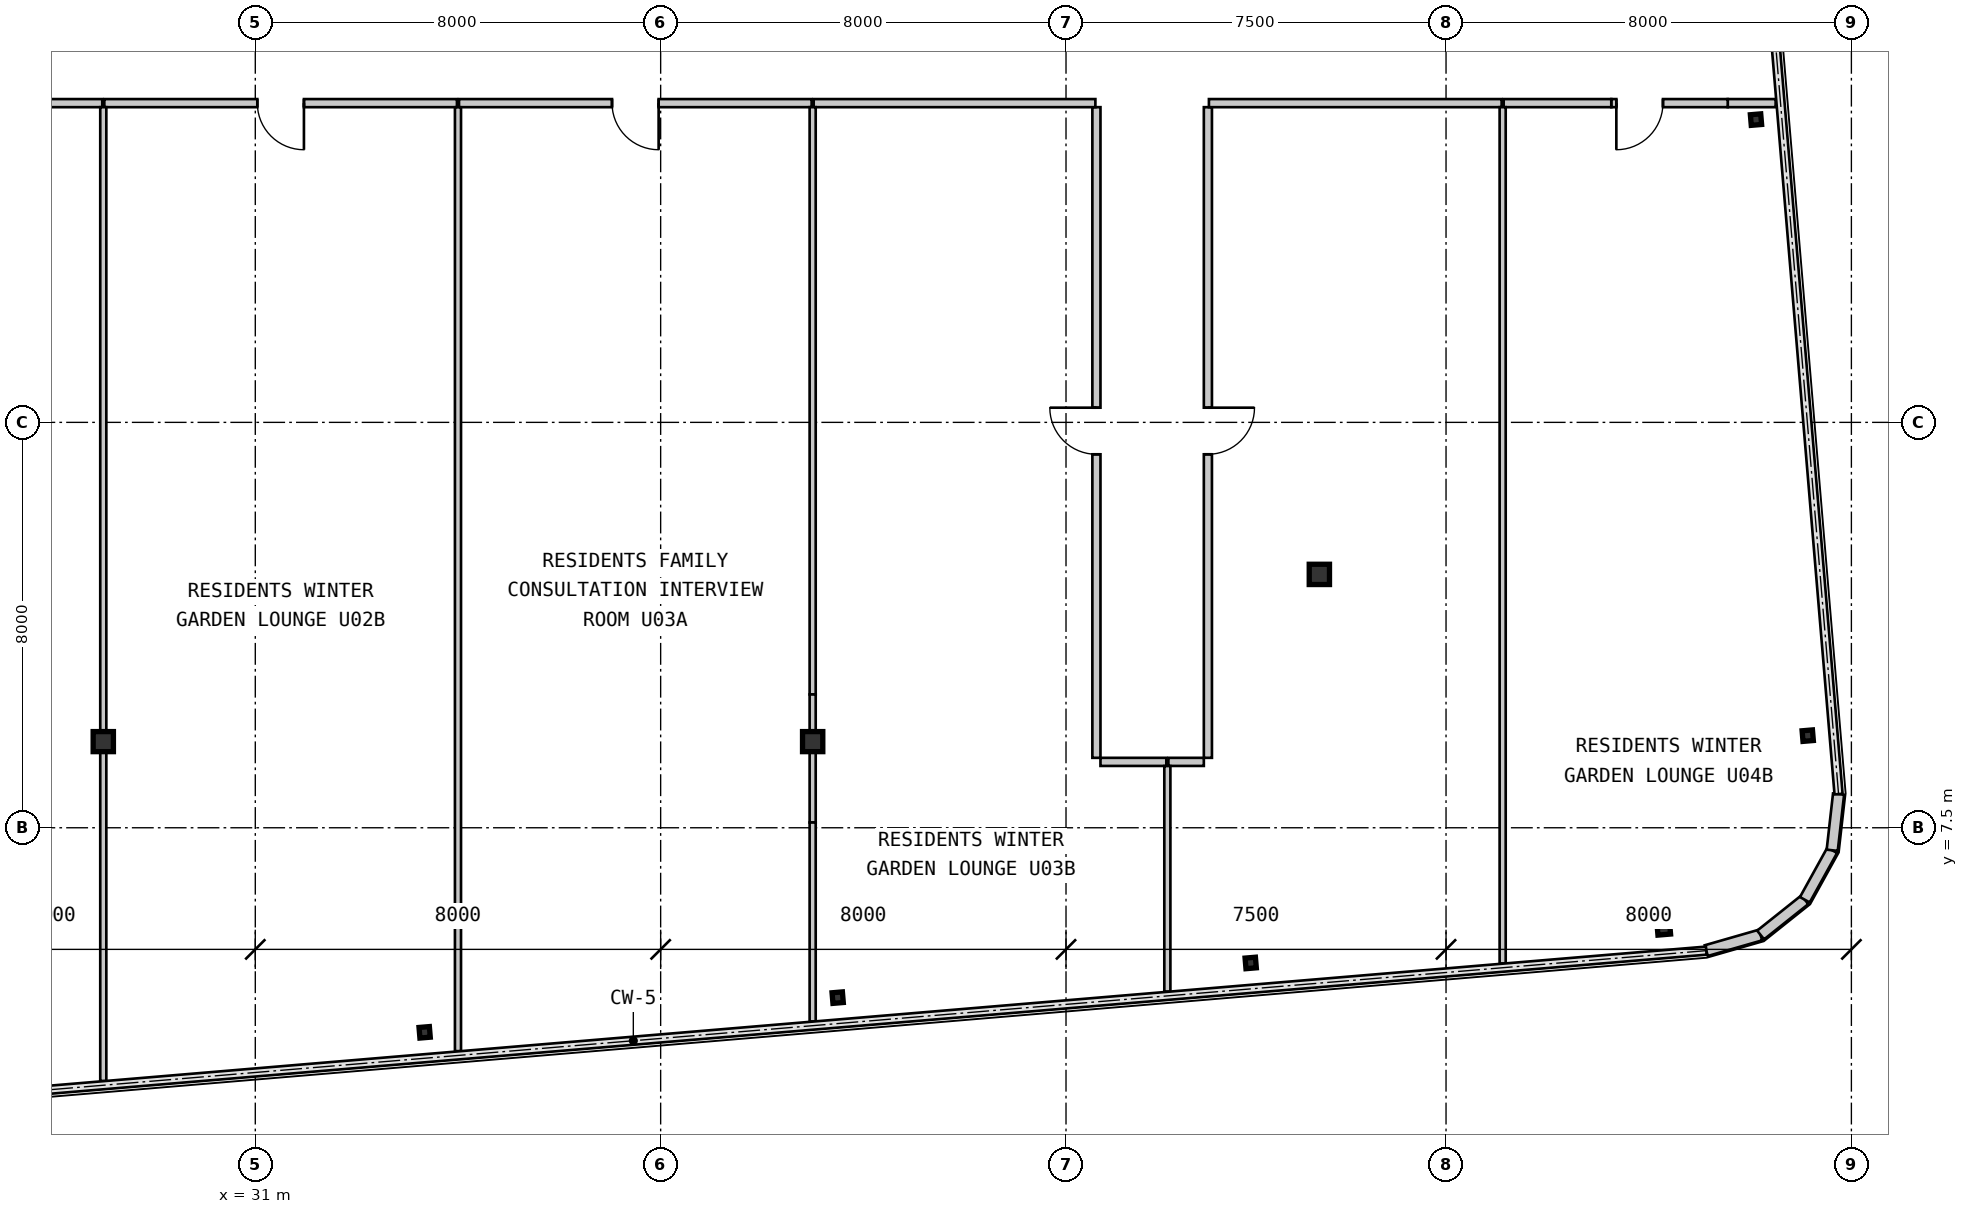
"""IFC4 building model, lengths in metres.
Left out: names, types, materials, properties, quantities, classifications, styles, units other than length and angle.
Written with IfcOpenShell. Run it as: python <this file> out.ifc"""

import sys

from ifc_helpers import new_model, si_unit, direction, frame, frame_2d, origin, origin_2d, place, context, subcontext, project, spatial, rectangle, hollow_rectangle, i_section, extrude, source, transform, mapped, element, fill, save


model = new_model("IFC4")
c1 = context("Model", 3, precision=1e-05, world=origin(), true_north=direction((0.0, 1.0)))
c2 = subcontext(c1, "Body", "Model", "MODEL_VIEW")
j1 = project(units=[si_unit("LENGTHUNIT", "METRE"), si_unit("PLANEANGLEUNIT", "RADIAN")], contexts=[c1])
p1 = place(None, origin())
s1 = spatial("IfcSite", under=j1, at=p1, CompositionType="ELEMENT")
p2 = place(p1, origin())
s2 = spatial("IfcBuilding", under=s1, at=p2, CompositionType="ELEMENT")
p3 = place(p2, frame((0.0, 0.0, 178.85)))
s3 = spatial("IfcBuildingStorey", under=s2, at=p3, CompositionType="ELEMENT", Elevation=178.85)
m1 = source(origin(), c2, "Body", "SweptSolid", [
    extrude(i_section(OverallWidth=0.4, OverallDepth=0.396, WebThickness=0.022, FlangeThickness=0.034, at=origin_2d()), origin(), (0.0, 0.0, 1.0), 3.15),
])
for number, where, z_axis, x_axis in (
    (1, (28.0, 9.2, 0.0), (0.0, 0.0, 1.0), (1.0, 0.0, 0.0)),
    (2, (42.0, 9.2, 0.0), (0.0, 0.0, 1.0), (1.0, 0.0, 0.0)),
):
    element("IfcColumn", number, at=place(p3, frame(where, z_axis=z_axis, x_axis=x_axis)), inside=s3, PredefinedType="COLUMN", context=c2, shape_type="MappedRepresentation", body=[
        mapped(m1, transform((0.0, 0.0, 0.0), scale=1.0)),
    ])
m2 = source(origin(), c2, "Body", "SweptSolid", [
    extrude(hollow_rectangle(XDim=0.4, YDim=0.4, WallThickness=0.016, at=origin_2d()), origin(), (0.0, 0.0, 1.0), 3.15),
])
p4 = place(p3, frame((52.0, 12.5, 0.0), z_axis=(0.0, 0.0, 1.0), x_axis=(1.0, 0.0, 0.0)))
e3 = element("IfcColumn", 3, at=p4, inside=s3, PredefinedType="COLUMN", context=c2, shape_type="MappedRepresentation", body=[
    mapped(m2, transform((0.0, 0.0, 0.0), scale=1.0)),
])
m3 = source(origin(), c2, "Body", "SweptSolid", [
    extrude(i_section(OverallWidth=0.205, OverallDepth=0.21, WebThickness=0.009, FlangeThickness=0.014, at=origin_2d()), origin(), (0.0, 0.0, 1.0), 3.15),
])
for number, where, z_axis, x_axis in (
    (4, (34.342, 3.463, 0.0), (0.0, 0.0, 1.0), (0.996, 0.084, 0.0)),
    (5, (42.494, 4.147, 0.0), (0.0, 0.0, 1.0), (0.996, 0.084, 0.0)),
    (6, (50.645, 4.832, 0.0), (0.0, 0.0, 1.0), (0.996, 0.084, 0.0)),
):
    element("IfcColumn", number, at=place(p3, frame(where, z_axis=z_axis, x_axis=x_axis)), inside=s3, PredefinedType="COLUMN", context=c2, shape_type="MappedRepresentation", body=[
        mapped(m3, transform((0.0, 0.0, 0.0), scale=1.0)),
    ])
m4 = source(origin(), c2, "Body", "SweptSolid", [
    extrude(hollow_rectangle(XDim=0.25, YDim=0.25, WallThickness=0.01, at=origin_2d()), origin(), (0.0, 0.0, 1.0), 3.15),
])
p5 = place(p3, frame((58.796, 5.516, 0.0), z_axis=(0.0, 0.0, 1.0), x_axis=(0.99649285925, 0.083677843332, 0.0)))
e7 = element("IfcColumn", 7, at=p5, inside=s3, PredefinedType="COLUMN", context=c2, shape_type="MappedRepresentation", body=[
    mapped(m4, transform((0.0, 0.0, 0.0), scale=1.0)),
])
for number, where, z_axis, x_axis in (
    (8, (61.638, 9.318, 0.0), (0.0, 0.0, 1.0), (0.996, 0.084, 0.0)),
    (9, (60.617, 21.475, 0.0), (0.0, 0.0, 1.0), (0.996, 0.084, 0.0)),
):
    element("IfcColumn", number, at=place(p3, frame(where, z_axis=z_axis, x_axis=x_axis)), inside=s3, PredefinedType="COLUMN", context=c2, shape_type="MappedRepresentation", body=[
        mapped(m3, transform((0.0, 0.0, 0.0), scale=1.0)),
    ])
m5 = source(origin(), c2, "Body", "SweptSolid", [
    extrude(rectangle(XDim=1.116, YDim=0.22, at=frame_2d((0.558, 0.0))), origin(), (0.0, 0.0, 1.0), 2.93),
])
for number, where, z_axis, x_axis in (
    (10, (59.636, 5.075, 0.0), (0.0, 0.0, 1.0), (0.961, 0.277, 0.0)),
    (11, (60.708, 5.384, 0.0), (0.0, 0.0, 1.0), (0.782, 0.623, 0.0)),
    (12, (61.581, 6.079, 0.0), (0.0, 0.0, 1.0), (0.484, 0.875, 0.0)),
    (13, (62.121, 7.056, 0.0), (0.0, 0.0, 1.0), (0.112, 0.994, 0.0)),
):
    element("IfcWall", number, at=place(p3, frame(where, z_axis=z_axis, x_axis=x_axis)), inside=s3, PredefinedType="SOLIDWALL", context=c2, shape_type="MappedRepresentation", body=[
        mapped(m5, transform((0.0, 0.0, 0.0), scale=1.0)),
    ])
m6 = source(origin(), c2, "Body", "SweptSolid", [
    extrude(rectangle(XDim=5.559, YDim=0.16, at=frame_2d((2.78, 0.0))), origin(), (0.0, 0.0, 1.0), 2.93),
])
p6 = place(p3, frame((27.98, 21.8, 0.0), z_axis=(0.0, 0.0, 1.0), x_axis=(-1.0, 0.0, 0.0)))
e14 = element("IfcWall", 14, at=p6, inside=s3, PredefinedType="PARTITIONING", context=c2, shape_type="MappedRepresentation", body=[
    mapped(m6, transform((0.0, 0.0, 0.0), scale=1.0)),
])
m7 = source(origin(), c2, "Body", "SweptSolid", [
    extrude(rectangle(XDim=6.959, YDim=0.16, at=frame_2d((3.48, 0.0))), origin(), (0.0, 0.0, 1.0), 2.93),
])
p7 = place(p3, frame((34.98, 21.8, 0.0), z_axis=(0.0, 0.0, 1.0), x_axis=(-1.0, 0.0, 0.0)))
e15 = element("IfcWall", 15, at=p7, inside=s3, PredefinedType="PARTITIONING", context=c2, shape_type="MappedRepresentation", body=[
    mapped(m7, transform((0.0, 0.0, 0.0), scale=1.0)),
])
m8 = source(origin(), c2, "Body", "SweptSolid", [
    extrude(rectangle(XDim=0.92, YDim=2.1, at=frame_2d((0.46, 1.05))), frame((0.0, 0.09, 0.0), z_axis=(0.0, -1.0, 0.0), x_axis=(1.0, 0.0, 0.0)), (0.0, 0.0, 1.0), 0.18),
])
p8 = place(p7, frame((3.02, 0.0, 0.0)))
e16 = element("IfcOpeningElement", 16, at=p8, cuts=e15, PredefinedType="OPENING", context=c2, shape_type="MappedRepresentation", body=[
    mapped(m8, transform((0.0, 0.0, 0.0), scale=1.0)),
])
p9 = place(p3, frame((41.98, 21.8, 0.0), z_axis=(0.0, 0.0, 1.0), x_axis=(-1.0, 0.0, 0.0)))
e17 = element("IfcWall", 17, at=p9, inside=s3, PredefinedType="PARTITIONING", context=c2, shape_type="MappedRepresentation", body=[
    mapped(m7, transform((0.0, 0.0, 0.0), scale=1.0)),
])
p10 = place(p9, frame((3.02, 0.0, 0.0)))
e18 = element("IfcOpeningElement", 18, at=p10, cuts=e17, PredefinedType="OPENING", context=c2, shape_type="MappedRepresentation", body=[
    mapped(m8, transform((0.0, 0.0, 0.0), scale=1.0)),
])
m9 = source(origin(), c2, "Body", "SweptSolid", [
    extrude(rectangle(XDim=12.84, YDim=0.16, at=frame_2d((6.42, 0.0))), origin(), (0.0, 0.0, 1.0), 2.93),
])
p11 = place(p3, frame((47.6, 8.88, 0.0), z_axis=(0.0, 0.0, 1.0), x_axis=(0.0, 1.0, 0.0)))
e19 = element("IfcWall", 19, at=p11, inside=s3, PredefinedType="PARTITIONING", context=c2, shape_type="MappedRepresentation", body=[
    mapped(m9, transform((0.0, 0.0, 0.0), scale=1.0)),
])
p12 = place(p11, frame((5.99, 0.0, 0.0)))
e20 = element("IfcOpeningElement", 20, at=p12, cuts=e19, PredefinedType="OPENING", context=c2, shape_type="MappedRepresentation", body=[
    mapped(m8, transform((0.0, 0.0, 0.0), scale=1.0)),
])
p13 = place(p3, frame((47.58, 21.8, 0.0), z_axis=(0.0, 0.0, 1.0), x_axis=(-1.0, 0.0, 0.0)))
e21 = element("IfcWall", 21, at=p13, inside=s3, PredefinedType="PARTITIONING", context=c2, shape_type="MappedRepresentation", body=[
    mapped(m6, transform((0.0, 0.0, 0.0), scale=1.0)),
])
m10 = source(origin(), c2, "Body", "SweptSolid", [
    extrude(rectangle(XDim=1.3, YDim=0.16, at=frame_2d((0.65, 0.0))), origin(), (0.0, 0.0, 1.0), 2.93),
])
p14 = place(p3, frame((48.98, 8.8, 0.0), z_axis=(0.0, 0.0, 1.0), x_axis=(-1.0, 0.0, 0.0)))
e22 = element("IfcWall", 22, at=p14, inside=s3, PredefinedType="PARTITIONING", context=c2, shape_type="MappedRepresentation", body=[
    mapped(m10, transform((0.0, 0.0, 0.0), scale=1.0)),
])
p15 = place(p3, frame((49.8, 21.72, 0.0), z_axis=(0.0, 0.0, 1.0), x_axis=(0.0, -1.0, 0.0)))
e23 = element("IfcWall", 23, at=p15, inside=s3, PredefinedType="PARTITIONING", context=c2, shape_type="MappedRepresentation", body=[
    mapped(m9, transform((0.0, 0.0, 0.0), scale=1.0)),
])
p16 = place(p15, frame((5.93, 0.0, 0.0)))
e24 = element("IfcOpeningElement", 24, at=p16, cuts=e23, PredefinedType="OPENING", context=c2, shape_type="MappedRepresentation", body=[
    mapped(m8, transform((0.0, 0.0, 0.0), scale=1.0)),
])
m11 = source(origin(), c2, "Body", "SweptSolid", [
    extrude(rectangle(XDim=5.777, YDim=0.16, at=frame_2d((2.889, 0.0))), origin(), (0.0, 0.0, 1.0), 2.93),
])
p17 = place(p3, frame((55.597, 21.8, 0.0), z_axis=(0.0, 0.0, 1.0), x_axis=(-1.0, 0.0, 0.0)))
e25 = element("IfcWall", 25, at=p17, inside=s3, PredefinedType="PARTITIONING", context=c2, shape_type="MappedRepresentation", body=[
    mapped(m11, transform((0.0, 0.0, 0.0), scale=1.0)),
])
m12 = source(origin(), c2, "Body", "SweptSolid", [
    extrude(rectangle(XDim=0.7, YDim=0.16, at=frame_2d((0.35, 0.0))), origin(), (0.0, 0.0, 1.0), 2.93),
])
p18 = place(p3, frame((49.72, 8.8, 0.0), z_axis=(0.0, 0.0, 1.0), x_axis=(-1.0, 0.0, 0.0)))
e26 = element("IfcWall", 26, at=p18, inside=s3, PredefinedType="PARTITIONING", context=c2, shape_type="MappedRepresentation", body=[
    mapped(m12, transform((0.0, 0.0, 0.0), scale=1.0)),
])
m13 = source(origin(), c2, "Body", "SweptSolid", [
    extrude(rectangle(XDim=0.945, YDim=0.16, at=frame_2d((0.473, 0.0))), origin(), (0.0, 0.0, 1.0), 2.93),
])
p19 = place(p3, frame((61.005, 21.8, 0.0), z_axis=(0.0, 0.0, 1.0), x_axis=(-1.0, 0.0, 0.0)))
e27 = element("IfcWall", 27, at=p19, inside=s3, PredefinedType="PARTITIONING", context=c2, shape_type="MappedRepresentation", body=[
    mapped(m13, transform((0.0, 0.0, 0.0), scale=1.0)),
])
m14 = source(origin(), c2, "Body", "SweptSolid", [
    extrude(rectangle(XDim=2.298, YDim=0.16, at=frame_2d((1.149, 0.0))), origin(), (0.0, 0.0, 1.0), 2.47),
])
p20 = place(p3, frame((60.059, 21.8, 0.0), z_axis=(0.0, 0.0, 1.0), x_axis=(-1.0, 0.0, 0.0)))
e28 = element("IfcWall", 28, at=p20, inside=s3, PredefinedType="PARTITIONING", context=c2, shape_type="MappedRepresentation", body=[
    mapped(m14, transform((0.0, 0.0, 0.0), scale=1.0)),
])
p21 = place(p20, frame((1.278, 0.0, 0.0)))
e29 = element("IfcOpeningElement", 29, at=p21, cuts=e28, PredefinedType="OPENING", context=c2, shape_type="MappedRepresentation", body=[
    mapped(m8, transform((0.0, 0.0, 0.0), scale=1.0)),
])
m15 = source(origin(), c2, "Body", "SweptSolid", [
    extrude(rectangle(XDim=2.124, YDim=0.16, at=frame_2d((1.062, 0.0))), origin(), (0.0, 0.0, 1.0), 2.93),
])
p22 = place(p3, frame((57.761, 21.8, 0.0), z_axis=(0.0, 0.0, 1.0), x_axis=(-1.0, 0.0, 0.0)))
e30 = element("IfcWall", 30, at=p22, inside=s3, PredefinedType="PARTITIONING", context=c2, shape_type="MappedRepresentation", body=[
    mapped(m15, transform((0.0, 0.0, 0.0), scale=1.0)),
])
m16 = source(origin(), c2, "Body", "SweptSolid", [
    extrude(rectangle(XDim=12.52, YDim=0.12, at=frame_2d((6.26, 0.0))), origin(), (0.0, 0.0, 1.0), 2.328),
])
p23 = place(p3, frame((28.0, 21.72, 0.0), z_axis=(0.0, 0.0, 1.0), x_axis=(0.0, -1.0, 0.0)))
e31 = element("IfcWall", 31, at=p23, inside=s3, PredefinedType="PARTITIONING", context=c2, shape_type="MappedRepresentation", body=[
    mapped(m16, transform((0.0, 0.0, 0.0), scale=1.0)),
])
m17 = source(origin(), c2, "Body", "SweptSolid", [
    extrude(rectangle(XDim=6.698, YDim=0.12, at=frame_2d((3.349, 0.0))), origin(), (0.0, 0.0, 1.0), 2.93),
])
p24 = place(p3, frame((28.0, 9.2, 0.0), z_axis=(0.0, 0.0, 1.0), x_axis=(0.0, -1.0, 0.0)))
e32 = element("IfcWall", 32, at=p24, inside=s3, PredefinedType="PARTITIONING", context=c2, shape_type="MappedRepresentation", body=[
    mapped(m17, transform((0.0, 0.0, 0.0), scale=1.0)),
])
m18 = source(origin(), c2, "Body", "SweptSolid", [
    extrude(rectangle(XDim=18.626, YDim=0.12, at=frame_2d((9.313, 0.0))), origin(), (0.0, 0.0, 1.0), 2.93),
])
p25 = place(p3, frame((35.0, 21.718, 0.0), z_axis=(0.0, 0.0, 1.0), x_axis=(0.0, -1.0, 0.0)))
e33 = element("IfcWall", 33, at=p25, inside=s3, PredefinedType="PARTITIONING", context=c2, shape_type="MappedRepresentation", body=[
    mapped(m18, transform((0.0, 0.0, 0.0), scale=1.0)),
])
m19 = source(origin(), c2, "Body", "SweptSolid", [
    extrude(rectangle(XDim=11.59, YDim=0.12, at=frame_2d((5.795, 0.0))), origin(), (0.0, 0.0, 1.0), 2.93),
])
p26 = place(p3, frame((42.0, 21.72, 0.0), z_axis=(0.0, 0.0, 1.0), x_axis=(0.0, -1.0, 0.0)))
e34 = element("IfcWall", 34, at=p26, inside=s3, PredefinedType="PARTITIONING", context=c2, shape_type="MappedRepresentation", body=[
    mapped(m19, transform((0.0, 0.0, 0.0), scale=1.0)),
])
m20 = source(origin(), c2, "Body", "SweptSolid", [
    extrude(rectangle(XDim=0.942, YDim=0.12, at=frame_2d((0.471, 0.0))), origin(), (0.0, 0.0, 1.0), 2.328),
])
p27 = place(p3, frame((42.0, 10.13, 0.0), z_axis=(0.0, 0.0, 1.0), x_axis=(0.0, -1.0, 0.0)))
e35 = element("IfcWall", 35, at=p27, inside=s3, PredefinedType="PARTITIONING", context=c2, shape_type="MappedRepresentation", body=[
    mapped(m20, transform((0.0, 0.0, 0.0), scale=1.0)),
])
m21 = source(origin(), c2, "Body", "SweptSolid", [
    extrude(rectangle(XDim=1.585, YDim=0.12, at=frame_2d((0.792, 0.0))), origin(), (0.0, 0.0, 1.0), 2.47),
])
p28 = place(p3, frame((42.0, 9.189, 0.0), z_axis=(0.0, 0.0, 1.0), x_axis=(0.0, -1.0, 0.0)))
e36 = element("IfcWall", 36, at=p28, inside=s3, PredefinedType="PARTITIONING", context=c2, shape_type="MappedRepresentation", body=[
    mapped(m21, transform((0.0, 0.0, 0.0), scale=1.0)),
])
m22 = source(origin(), c2, "Body", "SweptSolid", [
    extrude(rectangle(XDim=3.926, YDim=0.12, at=frame_2d((1.963, 0.0))), origin(), (0.0, 0.0, 1.0), 2.93),
])
p29 = place(p3, frame((42.0, 7.604, 0.0), z_axis=(0.0, 0.0, 1.0), x_axis=(0.0, -1.0, 0.0)))
e37 = element("IfcWall", 37, at=p29, inside=s3, PredefinedType="PARTITIONING", context=c2, shape_type="MappedRepresentation", body=[
    mapped(m22, transform((0.0, 0.0, 0.0), scale=1.0)),
])
m23 = source(origin(), c2, "Body", "SweptSolid", [
    extrude(rectangle(XDim=4.45, YDim=0.12, at=frame_2d((2.225, 0.0))), origin(), (0.0, 0.0, 1.0), 2.93),
])
p30 = place(p3, frame((49.0, 8.718, 0.0), z_axis=(0.0, 0.0, 1.0), x_axis=(0.0, -1.0, 0.0)))
e38 = element("IfcWall", 38, at=p30, inside=s3, PredefinedType="PARTITIONING", context=c2, shape_type="MappedRepresentation", body=[
    mapped(m23, transform((0.0, 0.0, 0.0), scale=1.0)),
])
m24 = source(origin(), c2, "Body", "SweptSolid", [
    extrude(rectangle(XDim=16.899, YDim=0.12, at=frame_2d((8.449, 0.0))), origin(), (0.0, 0.0, 1.0), 2.93),
])
p31 = place(p3, frame((55.618, 21.72, 0.0), z_axis=(0.0, 0.0, 1.0), x_axis=(0.0, -1.0, 0.0)))
e39 = element("IfcWall", 39, at=p31, inside=s3, PredefinedType="PARTITIONING", context=c2, shape_type="MappedRepresentation", body=[
    mapped(m24, transform((0.0, 0.0, 0.0), scale=1.0)),
])
m25 = source(origin(), c2, "Body", "SweptSolid", [
    extrude(rectangle(XDim=0.92, YDim=2.1, at=frame_2d((0.46, 1.05))), frame((0.0, 0.025, 0.0), z_axis=(0.0, -1.0, 0.0), x_axis=(1.0, 0.0, 0.0)), (0.0, 0.0, 1.0), 0.05),
])
p32 = place(p8, origin())
e40 = element("IfcDoor", 40, at=p32, inside=s3, OperationType="SINGLE_SWING_LEFT", PredefinedType="DOOR", context=c2, shape_type="MappedRepresentation", body=[
    mapped(m25, transform((0.0, 0.0, 0.0), scale=1.0)),
])
fill(e16, e40)
p33 = place(p10, origin())
e41 = element("IfcDoor", 41, at=p33, inside=s3, OperationType="SINGLE_SWING_LEFT", PredefinedType="DOOR", context=c2, shape_type="MappedRepresentation", body=[
    mapped(m25, transform((0.0, 0.0, 0.0), scale=1.0)),
])
fill(e18, e41)
p34 = place(p12, origin())
e42 = element("IfcDoor", 42, at=p34, inside=s3, OperationType="SINGLE_SWING_RIGHT", PredefinedType="DOOR", context=c2, shape_type="MappedRepresentation", body=[
    mapped(m25, transform((0.0, 0.0, 0.0), scale=1.0)),
])
fill(e20, e42)
p35 = place(p16, origin())
e43 = element("IfcDoor", 43, at=p35, inside=s3, OperationType="SINGLE_SWING_LEFT", PredefinedType="DOOR", context=c2, shape_type="MappedRepresentation", body=[
    mapped(m25, transform((0.0, 0.0, 0.0), scale=1.0)),
])
fill(e24, e43)
p36 = place(p21, origin())
e44 = element("IfcDoor", 44, at=p36, inside=s3, OperationType="SINGLE_SWING_RIGHT", PredefinedType="DOOR", context=c2, shape_type="MappedRepresentation", body=[
    mapped(m25, transform((0.0, 0.0, 0.0), scale=1.0)),
])
fill(e29, e44)
save(model, sys.argv[1])
